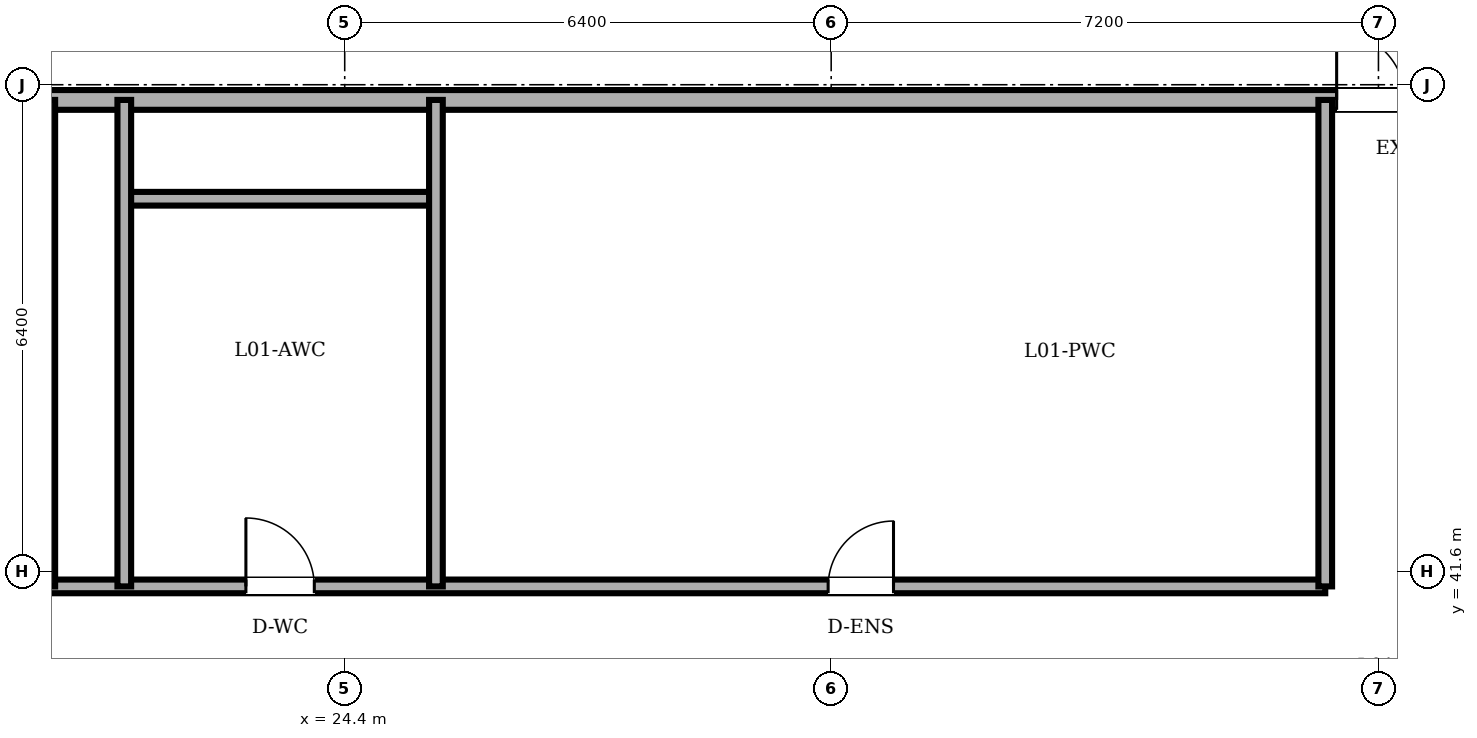
"""IFC4 building model, lengths in metres.
Left out: names, types, materials, properties, quantities, classifications, styles, units other than length and angle.
Written with IfcOpenShell. Run it as: python <this file> out.ifc"""

import sys

from ifc_helpers import new_model, si_unit, direction, frame, frame_2d, origin, place, context, subcontext, project, spatial, rectangle, extrude, element, fill, save


model = new_model("IFC4")
c1 = context("Model", 3, precision=1e-05, world=origin(), true_north=direction((0.0, 1.0)))
c2 = subcontext(c1, "Body", "Model", "MODEL_VIEW")
j1 = project(units=[si_unit("LENGTHUNIT", "METRE"), si_unit("PLANEANGLEUNIT", "RADIAN")], contexts=[c1])
p1 = place(None, origin())
s1 = spatial("IfcSite", under=j1, at=p1, CompositionType="ELEMENT")
p2 = place(p1, origin())
s2 = spatial("IfcBuilding", under=s1, at=p2, CompositionType="ELEMENT")
p3 = place(p2, origin())
s3 = spatial("IfcBuildingStorey", under=s2, at=p3, CompositionType="ELEMENT", Elevation=0.0)
p4 = place(p3, frame((1.6, 47.8, 0.0), z_axis=(0.0, 0.0, 1.0), x_axis=(1.0, 0.0, 0.0)))
e1 = element("IfcWall", 1, at=p4, inside=s3, PredefinedType="SOLIDWALL", context=c2, shape_type="SweptSolid", body=[
    extrude(rectangle(XDim=72.2, YDim=0.26, at=frame_2d((36.1, 0.0))), origin(), (0.0, 0.0, 1.0), 5.18),
])
p5 = place(p4, frame((16.95, 0.0, 0.0)))
e2 = element("IfcOpeningElement", 2, at=p5, cuts=e1, PredefinedType="OPENING", context=c2, shape_type="SweptSolid", body=[
    extrude(rectangle(XDim=1.8, YDim=2.4, at=frame_2d((0.9, 1.2))), frame((0.0, 0.14, 0.0), z_axis=(0.0, -1.0, 0.0), x_axis=(1.0, 0.0, 0.0)), (0.0, 0.0, 1.0), 0.28),
])
p6 = place(p4, frame((35.85, 0.0, 0.0)))
e3 = element("IfcOpeningElement", 3, at=p6, cuts=e1, PredefinedType="OPENING", context=c2, shape_type="SweptSolid", body=[
    extrude(rectangle(XDim=1.8, YDim=2.4, at=frame_2d((0.9, 1.2))), frame((0.0, 0.14, 0.0), z_axis=(0.0, -1.0, 0.0), x_axis=(1.0, 0.0, 0.0)), (0.0, 0.0, 1.0), 0.28),
])
p7 = place(p4, frame((6.0, 0.0, 0.9)))
e4 = element("IfcOpeningElement", 4, at=p7, cuts=e1, PredefinedType="OPENING", context=c2, shape_type="SweptSolid", body=[
    extrude(rectangle(XDim=3.2, YDim=2.8, at=frame_2d((1.6, 1.4))), frame((0.0, 0.14, 0.0), z_axis=(0.0, -1.0, 0.0), x_axis=(1.0, 0.0, 0.0)), (0.0, 0.0, 1.0), 0.28),
])
p8 = place(p4, frame((12.0, 0.0, 0.9)))
e5 = element("IfcOpeningElement", 5, at=p8, cuts=e1, PredefinedType="OPENING", context=c2, shape_type="SweptSolid", body=[
    extrude(rectangle(XDim=3.2, YDim=2.8, at=frame_2d((1.6, 1.4))), frame((0.0, 0.14, 0.0), z_axis=(0.0, -1.0, 0.0), x_axis=(1.0, 0.0, 0.0)), (0.0, 0.0, 1.0), 0.28),
])
p9 = place(p4, frame((44.0, 0.0, 0.9)))
e6 = element("IfcOpeningElement", 6, at=p9, cuts=e1, PredefinedType="OPENING", context=c2, shape_type="SweptSolid", body=[
    extrude(rectangle(XDim=3.2, YDim=2.8, at=frame_2d((1.6, 1.4))), frame((0.0, 0.14, 0.0), z_axis=(0.0, -1.0, 0.0), x_axis=(1.0, 0.0, 0.0)), (0.0, 0.0, 1.0), 0.28),
])
p10 = place(p4, frame((52.0, 0.0, 0.9)))
e7 = element("IfcOpeningElement", 7, at=p10, cuts=e1, PredefinedType="OPENING", context=c2, shape_type="SweptSolid", body=[
    extrude(rectangle(XDim=3.2, YDim=2.8, at=frame_2d((1.6, 1.4))), frame((0.0, 0.14, 0.0), z_axis=(0.0, -1.0, 0.0), x_axis=(1.0, 0.0, 0.0)), (0.0, 0.0, 1.0), 0.28),
])
p11 = place(p3, frame((20.5, 41.4, 0.0), z_axis=(0.0, 0.0, 1.0), x_axis=(1.0, 0.0, 0.0)))
e8 = element("IfcWall", 8, at=p11, inside=s3, PredefinedType="PARTITIONING", context=c2, shape_type="SweptSolid", body=[
    extrude(rectangle(XDim=16.8, YDim=0.18, at=frame_2d((8.4, 0.0))), origin(), (0.0, 0.0, 1.0), 5.18),
])
p12 = place(p11, frame((2.6, 0.0, 0.0)))
e9 = element("IfcOpeningElement", 9, at=p12, cuts=e8, PredefinedType="OPENING", context=c2, shape_type="SweptSolid", body=[
    extrude(rectangle(XDim=0.9, YDim=2.1, at=frame_2d((0.45, 1.05))), frame((0.0, 0.1, 0.0), z_axis=(0.0, -1.0, 0.0), x_axis=(1.0, 0.0, 0.0)), (0.0, 0.0, 1.0), 0.2),
])
p13 = place(p11, frame((10.26, 0.0, 0.0)))
e10 = element("IfcOpeningElement", 10, at=p13, cuts=e8, PredefinedType="OPENING", context=c2, shape_type="SweptSolid", body=[
    extrude(rectangle(XDim=0.86, YDim=2.1, at=frame_2d((0.43, 1.05))), frame((0.0, 0.1, 0.0), z_axis=(0.0, -1.0, 0.0), x_axis=(1.0, 0.0, 0.0)), (0.0, 0.0, 1.0), 0.2),
])
p14 = place(p3, frame((21.5, 46.5, 0.0), z_axis=(0.0, 0.0, 1.0), x_axis=(1.0, 0.0, 0.0)))
e11 = element("IfcWall", 11, at=p14, inside=s3, PredefinedType="PARTITIONING", context=c2, shape_type="SweptSolid", body=[
    extrude(rectangle(XDim=4.1, YDim=0.18, at=frame_2d((2.05, 0.0))), origin(), (0.0, 0.0, 1.0), 5.18),
])
for number, where, z_axis, x_axis in (
    (12, (20.5, 41.4, 0.0), (0.0, 0.0, 1.0), (0.0, 1.0, 0.0)),
    (13, (21.5, 41.4, 0.0), (0.0, 0.0, 1.0), (0.0, 1.0, 0.0)),
    (14, (25.6, 41.4, 0.0), (0.0, 0.0, 1.0), (0.0, 1.0, 0.0)),
    (15, (37.3, 41.4, 0.0), (0.0, 0.0, 1.0), (0.0, 1.0, 0.0)),
):
    element("IfcWall", number, at=place(p3, frame(where, z_axis=z_axis, x_axis=x_axis)), inside=s3, PredefinedType="PARTITIONING", context=c2, shape_type="SweptSolid", body=[
        extrude(rectangle(XDim=6.4, YDim=0.18, at=frame_2d((3.2, 0.0))), origin(), (0.0, 0.0, 1.0), 5.18),
    ])
p15 = place(p6, origin())
e16 = element("IfcDoor", 16, at=p15, inside=s3, OperationType="DOUBLE_DOOR_SINGLE_SWING", PredefinedType="DOOR", context=c2, shape_type="SweptSolid", body=[
    extrude(rectangle(XDim=1.8, YDim=2.4, at=frame_2d((0.9, 1.2))), frame((0.0, 0.025, 0.0), z_axis=(0.0, -1.0, 0.0), x_axis=(1.0, 0.0, 0.0)), (0.0, 0.0, 1.0), 0.05),
])
fill(e3, e16)
p16 = place(p12, origin())
e17 = element("IfcDoor", 17, at=p16, inside=s3, OperationType="SINGLE_SWING_LEFT", PredefinedType="DOOR", context=c2, shape_type="SweptSolid", body=[
    extrude(rectangle(XDim=0.9, YDim=2.1, at=frame_2d((0.45, 1.05))), frame((0.0, 0.025, 0.0), z_axis=(0.0, -1.0, 0.0), x_axis=(1.0, 0.0, 0.0)), (0.0, 0.0, 1.0), 0.05),
])
fill(e9, e17)
p17 = place(p13, origin())
e18 = element("IfcDoor", 18, at=p17, inside=s3, OperationType="SINGLE_SWING_RIGHT", PredefinedType="DOOR", context=c2, shape_type="SweptSolid", body=[
    extrude(rectangle(XDim=0.86, YDim=2.1, at=frame_2d((0.43, 1.05))), frame((0.0, 0.025, 0.0), z_axis=(0.0, -1.0, 0.0), x_axis=(1.0, 0.0, 0.0)), (0.0, 0.0, 1.0), 0.05),
])
fill(e10, e18)
save(model, sys.argv[1])
